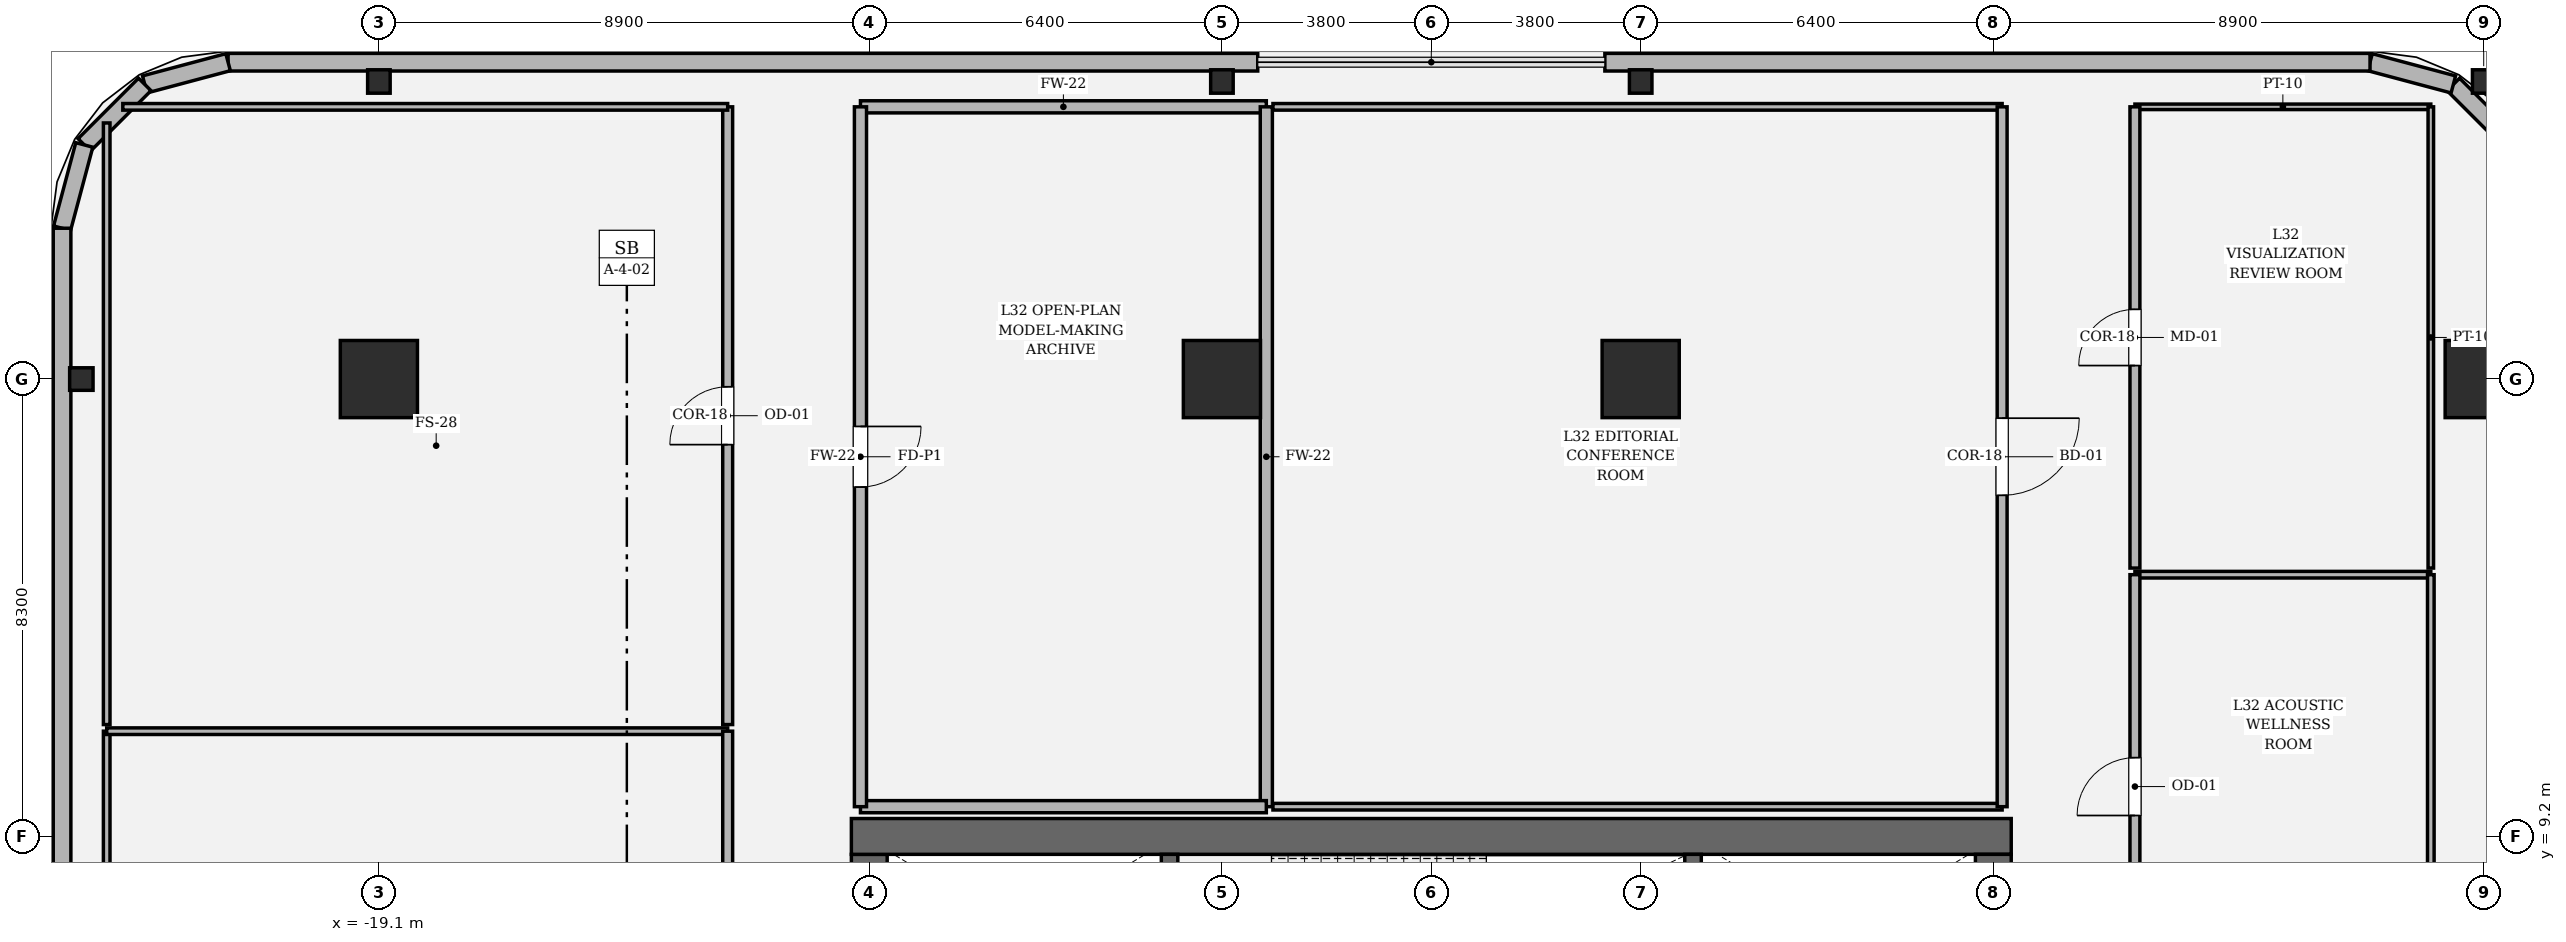
"""IFC4 building model, lengths in metres.
Left out: names, types, materials, properties, quantities, classifications, styles, units other than length and angle.
Written with IfcOpenShell. Run it as: python <this file> out.ifc"""

import sys

from ifc_helpers import new_model, si_unit, direction, frame, frame_2d, origin, origin_2d, place, context, subcontext, project, spatial, rectangle, hollow_rectangle, i_section, extrude, element, fill, save


model = new_model("IFC4")
c1 = context("Model", 3, precision=1e-05, world=origin(), true_north=direction((0.0, 1.0)))
c2 = subcontext(c1, "Body", "Model", "MODEL_VIEW")
j1 = project(units=[si_unit("LENGTHUNIT", "METRE"), si_unit("PLANEANGLEUNIT", "RADIAN")], contexts=[c1])
p1 = place(None, origin())
s1 = spatial("IfcSite", under=j1, at=p1, CompositionType="ELEMENT")
p2 = place(p1, origin())
s2 = spatial("IfcBuilding", under=s1, at=p2, CompositionType="ELEMENT")
p3 = place(p2, frame((0.0, 0.0, 139.8)))
s3 = spatial("IfcBuildingStorey", under=s2, at=p3, CompositionType="ELEMENT", Elevation=139.8)
p4 = place(p3, frame((-10.2, -8.875, 0.0), z_axis=(0.0, 0.0, 1.0), x_axis=(0.0, 1.0, 0.0)))
e1 = element("IfcWall", 1, at=p4, inside=s3, PredefinedType="SHEAR", context=c2, shape_type="SweptSolid", body=[
    extrude(rectangle(XDim=17.75, YDim=0.65, at=frame_2d((8.875, 0.0))), origin(), (0.0, 0.0, 1.0), 4.05),
])
p5 = place(p4, frame((12.665, 0.0, 0.0)))
e2 = element("IfcOpeningElement", 2, at=p5, cuts=e1, PredefinedType="OPENING", context=c2, shape_type="SweptSolid", body=[
    extrude(rectangle(XDim=1.18, YDim=2.2, at=frame_2d((0.59, 1.1))), frame((0.0, 0.335, 0.0), z_axis=(0.0, -1.0, 0.0), x_axis=(1.0, 0.0, 0.0)), (0.0, 0.0, 1.0), 0.67),
])
p6 = place(p3, frame((-10.525, 9.2, 0.0), z_axis=(0.0, 0.0, 1.0), x_axis=(1.0, 0.0, 0.0)))
e3 = element("IfcWall", 3, at=p6, inside=s3, PredefinedType="SHEAR", context=c2, shape_type="SweptSolid", body=[
    extrude(rectangle(XDim=21.05, YDim=0.65, at=frame_2d((10.525, 0.0))), origin(), (0.0, 0.0, 1.0), 4.05),
])
p7 = place(p3, frame((10.2, 8.875, 0.0), z_axis=(0.0, 0.0, 1.0), x_axis=(0.0, -1.0, 0.0)))
e4 = element("IfcWall", 4, at=p7, inside=s3, PredefinedType="SHEAR", context=c2, shape_type="SweptSolid", body=[
    extrude(rectangle(XDim=17.75, YDim=0.65, at=frame_2d((8.875, 0.0))), origin(), (0.0, 0.0, 1.0), 4.05),
])
p8 = place(p7, frame((3.905, 0.0, 0.0)))
e5 = element("IfcOpeningElement", 5, at=p8, cuts=e4, PredefinedType="OPENING", context=c2, shape_type="SweptSolid", body=[
    extrude(rectangle(XDim=1.18, YDim=2.2, at=frame_2d((0.59, 1.1))), frame((0.0, 0.335, 0.0), z_axis=(0.0, -1.0, 0.0), x_axis=(1.0, 0.0, 0.0)), (0.0, 0.0, 1.0), 0.67),
])
for number, where, z_axis, x_axis in (
    (6, (-4.75, 5.3, 0.0), (0.0, 0.0, 1.0), (0.0, 1.0, 0.0)),
    (7, (4.75, 8.875, 0.0), (0.0, 0.0, 1.0), (0.0, -1.0, 0.0)),
):
    element("IfcWall", number, at=place(p3, frame(where, z_axis=z_axis, x_axis=x_axis)), inside=s3, PredefinedType="SOLIDWALL", context=c2, shape_type="SweptSolid", body=[
        extrude(rectangle(XDim=3.575, YDim=0.3, at=frame_2d((1.788, 0.0))), origin(), (0.0, 0.0, 1.0), 4.05),
    ])
for number, where, z_axis, x_axis in (
    (8, (19.1, 17.5, 0.0), (0.0, 0.0, 1.0), (1.0, 0.0, 0.0)),
    (9, (3.8, 17.5, 0.0), (0.0, 0.0, 1.0), (1.0, 0.0, 0.0)),
    (10, (-3.8, 17.5, 0.0), (0.0, 0.0, 1.0), (1.0, 0.0, 0.0)),
    (11, (-19.1, 17.5, 0.0), (0.0, 0.0, 1.0), (1.0, 0.0, 0.0)),
):
    element("IfcColumn", number, at=place(p3, frame(where, z_axis=z_axis, x_axis=x_axis)), inside=s3, PredefinedType="COLUMN", context=c2, shape_type="SweptSolid", body=[
        extrude(hollow_rectangle(XDim=1.4, YDim=1.4, WallThickness=0.042, at=origin_2d()), origin(), (0.0, 0.0, 1.0), 4.05),
    ])
for number, where, z_axis, x_axis in (
    (12, (-19.1, 22.9, 0.0), (0.0, 0.0, 1.0), (1.0, 0.0, 0.0)),
    (13, (-3.8, 22.9, 0.0), (0.0, 0.0, 1.0), (1.0, 0.0, 0.0)),
    (14, (3.8, 22.9, 0.0), (0.0, 0.0, 1.0), (1.0, 0.0, 0.0)),
    (15, (19.1, 22.9, 0.0), (0.0, 0.0, 1.0), (1.0, 0.0, 0.0)),
    (16, (-24.5, 17.5, 0.0), (0.0, 0.0, 1.0), (0.0, 1.0, 0.0)),
):
    element("IfcColumn", number, at=place(p3, frame(where, z_axis=z_axis, x_axis=x_axis)), inside=s3, PredefinedType="COLUMN", context=c2, shape_type="SweptSolid", body=[
        extrude(i_section(OverallWidth=0.409, OverallDepth=0.425, WebThickness=0.032, FlangeThickness=0.052, FilletRadius=0.018, at=origin_2d()), origin(), (0.0, 0.0, 1.0), 4.048),
    ])
p9 = place(p3, frame((19.646, 21.749, 0.0), z_axis=(0.0, 0.0, 1.0), x_axis=(-0.707028130747, 0.707185422879, 0.0)))
e17 = element("IfcWall", 17, at=p9, inside=s3, PredefinedType="SOLIDWALL", context=c2, shape_type="SweptSolid", body=[
    extrude(rectangle(XDim=1.552, YDim=0.32, at=frame_2d((0.776, 0.0))), origin(), (0.0, 0.0, 1.0), 2.504),
])
p10 = place(p3, frame((18.549, 22.847, 0.0), z_axis=(0.0, 0.0, 1.0), x_axis=(-0.966224582397, 0.257701486942, 0.0)))
e18 = element("IfcWall", 18, at=p10, inside=s3, PredefinedType="SOLIDWALL", context=c2, shape_type="SweptSolid", body=[
    extrude(rectangle(XDim=1.565, YDim=0.32, at=frame_2d((0.783, 0.0))), origin(), (0.0, 0.0, 1.0), 2.544),
])
p11 = place(p3, frame((17.037, 23.25, 0.0), z_axis=(0.0, 0.0, 1.0), x_axis=(-1.0, 0.0, 0.0)))
e19 = element("IfcWall", 19, at=p11, inside=s3, PredefinedType="SOLIDWALL", context=c2, shape_type="SweptSolid", body=[
    extrude(rectangle(XDim=13.887, YDim=0.32, at=frame_2d((6.943, 0.0))), origin(), (0.0, 0.0, 1.0), 2.544),
])
p12 = place(p3, frame((-3.15, 23.25, 0.0), z_axis=(0.0, 0.0, 1.0), x_axis=(-1.0, 0.0, 0.0)))
e20 = element("IfcWall", 20, at=p12, inside=s3, PredefinedType="SOLIDWALL", context=c2, shape_type="SweptSolid", body=[
    extrude(rectangle(XDim=18.687, YDim=0.32, at=frame_2d((9.344, 0.0))), origin(), (0.0, 0.0, 1.0), 2.544),
])
p13 = place(p3, frame((-21.837, 23.25, 0.0), z_axis=(0.0, 0.0, 1.0), x_axis=(-0.966224582397, -0.257701486942, 0.0)))
e21 = element("IfcWall", 21, at=p13, inside=s3, PredefinedType="SOLIDWALL", context=c2, shape_type="SweptSolid", body=[
    extrude(rectangle(XDim=1.565, YDim=0.32, at=frame_2d((0.783, 0.0))), origin(), (0.0, 0.0, 1.0), 3.83),
])
p14 = place(p3, frame((-23.349, 22.847, 0.0), z_axis=(0.0, 0.0, 1.0), x_axis=(-0.707028130747, -0.707185422879, 0.0)))
e22 = element("IfcWall", 22, at=p14, inside=s3, PredefinedType="SOLIDWALL", context=c2, shape_type="SweptSolid", body=[
    extrude(rectangle(XDim=1.552, YDim=0.32, at=frame_2d((0.776, 0.0))), origin(), (0.0, 0.0, 1.0), 3.83),
])
p15 = place(p3, frame((-24.447, 21.749, 0.0), z_axis=(0.0, 0.0, 1.0), x_axis=(-0.257847112249, -0.966185730957, 0.0)))
e23 = element("IfcWall", 23, at=p15, inside=s3, PredefinedType="SOLIDWALL", context=c2, shape_type="SweptSolid", body=[
    extrude(rectangle(XDim=1.565, YDim=0.32, at=frame_2d((0.783, 0.0))), origin(), (0.0, 0.0, 1.0), 3.83),
])
p16 = place(p3, frame((-24.85, 20.237, 0.0), z_axis=(0.0, 0.0, 1.0), x_axis=(0.0, -1.0, 0.0)))
e24 = element("IfcWall", 24, at=p16, inside=s3, PredefinedType="SOLIDWALL", context=c2, shape_type="SweptSolid", body=[
    extrude(rectangle(XDim=17.487, YDim=0.32, at=frame_2d((8.743, 0.0))), origin(), (0.0, 0.0, 1.0), 2.544),
])
p17 = place(p3, frame((-24.04, -11.49, 0.0), z_axis=(0.0, 0.0, 1.0), x_axis=(0.0, 1.0, 0.0)))
e25 = element("IfcWall", 25, at=p17, inside=s3, PredefinedType="PARTITIONING", context=c2, shape_type="SweptSolid", body=[
    extrude(rectangle(XDim=22.6, YDim=0.12, at=frame_2d((11.3, 0.0))), origin(), (0.0, 0.0, 1.0), 2.504),
])
p18 = place(p3, frame((-24.04, 11.11, 0.0), z_axis=(0.0, 0.0, 1.0), x_axis=(1.0, 0.0, 0.0)))
e26 = element("IfcWall", 26, at=p18, inside=s3, PredefinedType="PARTITIONING", context=c2, shape_type="SweptSolid", body=[
    extrude(rectangle(XDim=11.27, YDim=0.12, at=frame_2d((5.635, 0.0))), origin(), (0.0, 0.0, 1.0), 3.174),
])
p19 = place(p3, frame((-12.77, 11.11, 0.0), z_axis=(0.0, 0.0, 1.0), x_axis=(0.0, -1.0, 0.0)))
e27 = element("IfcWall", 27, at=p19, inside=s3, PredefinedType="PARTITIONING", context=c2, shape_type="SweptSolid", body=[
    extrude(rectangle(XDim=22.6, YDim=0.18, at=frame_2d((11.3, 0.0))), origin(), (0.0, 0.0, 1.0), 3.174),
])
p20 = place(p19, frame((10.6, 0.0, 0.0)))
e28 = element("IfcOpeningElement", 28, at=p20, cuts=e27, PredefinedType="OPENING", context=c2, shape_type="SweptSolid", body=[
    extrude(rectangle(XDim=1.4, YDim=2.25, at=frame_2d((0.7, 1.125))), frame((0.0, 0.1, 0.0), z_axis=(0.0, -1.0, 0.0), x_axis=(1.0, 0.0, 0.0)), (0.0, 0.0, 1.0), 0.2),
])
p21 = place(p3, frame((12.77, 13.95, 0.0), z_axis=(0.0, 0.0, 1.0), x_axis=(1.0, 0.0, 0.0)))
e29 = element("IfcWall", 29, at=p21, inside=s3, PredefinedType="PARTITIONING", context=c2, shape_type="SweptSolid", body=[
    extrude(rectangle(XDim=5.37, YDim=0.12, at=frame_2d((2.685, 0.0))), origin(), (0.0, 0.0, 1.0), 3.424),
])
p22 = place(p3, frame((18.14, 13.95, 0.0), z_axis=(0.0, 0.0, 1.0), x_axis=(0.0, -1.0, 0.0)))
e30 = element("IfcWall", 30, at=p22, inside=s3, PredefinedType="PARTITIONING", context=c2, shape_type="SweptSolid", body=[
    extrude(rectangle(XDim=7.69, YDim=0.12, at=frame_2d((3.845, 0.0))), origin(), (0.0, 0.0, 1.0), 3.174),
])
p23 = place(p3, frame((12.77, 6.26, 0.0), z_axis=(0.0, 0.0, 1.0), x_axis=(0.0, 1.0, 0.0)))
e31 = element("IfcWall", 31, at=p23, inside=s3, PredefinedType="PARTITIONING", context=c2, shape_type="SweptSolid", body=[
    extrude(rectangle(XDim=7.69, YDim=0.18, at=frame_2d((3.845, 0.0))), origin(), (0.0, 0.0, 1.0), 3.174),
])
p24 = place(p23, frame((3.32, 0.0, 0.0)))
e32 = element("IfcOpeningElement", 32, at=p24, cuts=e31, PredefinedType="OPENING", context=c2, shape_type="SweptSolid", body=[
    extrude(rectangle(XDim=1.05, YDim=2.2, at=frame_2d((0.525, 1.1))), frame((0.0, 0.1, 0.0), z_axis=(0.0, -1.0, 0.0), x_axis=(1.0, 0.0, 0.0)), (0.0, 0.0, 1.0), 0.2),
])
p25 = place(p3, frame((-10.36, 22.44, 0.0), z_axis=(0.0, 0.0, 1.0), x_axis=(1.0, 0.0, 0.0)))
e33 = element("IfcWall", 33, at=p25, inside=s3, PredefinedType="SOLIDWALL", context=c2, shape_type="SweptSolid", body=[
    extrude(rectangle(XDim=7.366, YDim=0.22, at=frame_2d((3.683, 0.0))), origin(), (0.0, 0.0, 1.0), 2.504),
])
p26 = place(p3, frame((-2.994, 22.44, 0.0), z_axis=(0.0, 0.0, 1.0), x_axis=(0.0, -1.0, 0.0)))
e34 = element("IfcWall", 34, at=p26, inside=s3, PredefinedType="SOLIDWALL", context=c2, shape_type="SweptSolid", body=[
    extrude(rectangle(XDim=12.7, YDim=0.22, at=frame_2d((6.35, 0.0))), origin(), (0.0, 0.0, 1.0), 3.174),
])
p27 = place(p3, frame((-2.994, 9.74, 0.0), z_axis=(0.0, 0.0, 1.0), x_axis=(-1.0, 0.0, 0.0)))
e35 = element("IfcWall", 35, at=p27, inside=s3, PredefinedType="SOLIDWALL", context=c2, shape_type="SweptSolid", body=[
    extrude(rectangle(XDim=7.366, YDim=0.22, at=frame_2d((3.683, 0.0))), origin(), (0.0, 0.0, 1.0), 3.174),
])
p28 = place(p3, frame((-10.36, 9.74, 0.0), z_axis=(0.0, 0.0, 1.0), x_axis=(0.0, 1.0, 0.0)))
e36 = element("IfcWall", 36, at=p28, inside=s3, PredefinedType="SOLIDWALL", context=c2, shape_type="SweptSolid", body=[
    extrude(rectangle(XDim=12.7, YDim=0.22, at=frame_2d((6.35, 0.0))), origin(), (0.0, 0.0, 1.0), 3.174),
])
p29 = place(p28, frame((5.8, 0.0, 0.0)))
e37 = element("IfcOpeningElement", 37, at=p29, cuts=e36, PredefinedType="OPENING", context=c2, shape_type="SweptSolid", body=[
    extrude(rectangle(XDim=1.1, YDim=2.2, at=frame_2d((0.55, 1.1))), frame((0.0, 0.12, 0.0), z_axis=(0.0, -1.0, 0.0), x_axis=(1.0, 0.0, 0.0)), (0.0, 0.0, 1.0), 0.24),
])
p30 = place(p3, frame((10.36, 9.74, 0.0), z_axis=(0.0, 0.0, 1.0), x_axis=(-1.0, 0.0, 0.0)))
e38 = element("IfcWall", 38, at=p30, inside=s3, PredefinedType="PARTITIONING", context=c2, shape_type="SweptSolid", body=[
    extrude(rectangle(XDim=13.234, YDim=0.12, at=frame_2d((6.617, 0.0))), origin(), (0.0, 0.0, 1.0), 3.174),
])
p31 = place(p3, frame((-2.874, 22.44, 0.0), z_axis=(0.0, 0.0, 1.0), x_axis=(1.0, 0.0, 0.0)))
e39 = element("IfcWall", 39, at=p31, inside=s3, PredefinedType="PARTITIONING", context=c2, shape_type="SweptSolid", body=[
    extrude(rectangle(XDim=13.234, YDim=0.12, at=frame_2d((6.617, 0.0))), origin(), (0.0, 0.0, 1.0), 2.504),
])
p32 = place(p3, frame((10.36, 22.44, 0.0), z_axis=(0.0, 0.0, 1.0), x_axis=(0.0, -1.0, 0.0)))
e40 = element("IfcWall", 40, at=p32, inside=s3, PredefinedType="PARTITIONING", context=c2, shape_type="SweptSolid", body=[
    extrude(rectangle(XDim=12.7, YDim=0.18, at=frame_2d((6.35, 0.0))), origin(), (0.0, 0.0, 1.0), 3.174),
])
p33 = place(p32, frame((5.65, 0.0, 0.0)))
e41 = element("IfcOpeningElement", 41, at=p33, cuts=e40, PredefinedType="OPENING", context=c2, shape_type="SweptSolid", body=[
    extrude(rectangle(XDim=1.4, YDim=2.25, at=frame_2d((0.7, 1.125))), frame((0.0, 0.1, 0.0), z_axis=(0.0, -1.0, 0.0), x_axis=(1.0, 0.0, 0.0)), (0.0, 0.0, 1.0), 0.2),
])
p34 = place(p3, frame((-12.77, 22.44, 0.0), z_axis=(0.0, 0.0, 1.0), x_axis=(0.0, -1.0, 0.0)))
e42 = element("IfcWall", 42, at=p34, inside=s3, PredefinedType="PARTITIONING", context=c2, shape_type="SweptSolid", body=[
    extrude(rectangle(XDim=11.21, YDim=0.18, at=frame_2d((5.605, 0.0))), origin(), (0.0, 0.0, 1.0), 3.174),
])
p35 = place(p34, frame((5.08, 0.0, 0.0)))
e43 = element("IfcOpeningElement", 43, at=p35, cuts=e42, PredefinedType="OPENING", context=c2, shape_type="SweptSolid", body=[
    extrude(rectangle(XDim=1.05, YDim=2.2, at=frame_2d((0.525, 1.1))), frame((0.0, 0.1, 0.0), z_axis=(0.0, -1.0, 0.0), x_axis=(1.0, 0.0, 0.0)), (0.0, 0.0, 1.0), 0.2),
])
p36 = place(p3, frame((-24.04, 11.23, 0.0), z_axis=(0.0, 0.0, 1.0), x_axis=(0.0, 1.0, 0.0)))
e44 = element("IfcWall", 44, at=p36, inside=s3, PredefinedType="PARTITIONING", context=c2, shape_type="SweptSolid", body=[
    extrude(rectangle(XDim=10.917, YDim=0.12, at=frame_2d((5.459, 0.0))), origin(), (0.0, 0.0, 1.0), 2.504),
])
p37 = place(p3, frame((-23.748, 22.44, 0.0), z_axis=(0.0, 0.0, 1.0), x_axis=(1.0, 0.0, 0.0)))
e45 = element("IfcWall", 45, at=p37, inside=s3, PredefinedType="PARTITIONING", context=c2, shape_type="SweptSolid", body=[
    extrude(rectangle(XDim=10.978, YDim=0.12, at=frame_2d((5.489, 0.0))), origin(), (0.0, 0.0, 1.0), 2.504),
])
p38 = place(p3, frame((12.77, 22.44, 0.0), z_axis=(0.0, 0.0, 1.0), x_axis=(1.0, 0.0, 0.0)))
e46 = element("IfcWall", 46, at=p38, inside=s3, PredefinedType="PARTITIONING", context=c2, shape_type="SweptSolid", body=[
    extrude(rectangle(XDim=5.37, YDim=0.1, at=frame_2d((2.685, 0.0))), origin(), (0.0, 0.0, 1.0), 3.83),
])
p39 = place(p3, frame((18.14, 22.44, 0.0), z_axis=(0.0, 0.0, 1.0), x_axis=(0.0, -1.0, 0.0)))
e47 = element("IfcWall", 47, at=p39, inside=s3, PredefinedType="PARTITIONING", context=c2, shape_type="SweptSolid", body=[
    extrude(rectangle(XDim=8.37, YDim=0.1, at=frame_2d((4.185, 0.0))), origin(), (0.0, 0.0, 1.0), 3.174),
])
p40 = place(p3, frame((12.77, 14.07, 0.0), z_axis=(0.0, 0.0, 1.0), x_axis=(0.0, 1.0, 0.0)))
e48 = element("IfcWall", 48, at=p40, inside=s3, PredefinedType="PARTITIONING", context=c2, shape_type="SweptSolid", body=[
    extrude(rectangle(XDim=8.37, YDim=0.18, at=frame_2d((4.185, 0.0))), origin(), (0.0, 0.0, 1.0), 3.174),
])
p41 = place(p40, frame((3.675, 0.0, 0.0)))
e49 = element("IfcOpeningElement", 49, at=p41, cuts=e48, PredefinedType="OPENING", context=c2, shape_type="SweptSolid", body=[
    extrude(rectangle(XDim=1.02, YDim=2.2, at=frame_2d((0.51, 1.1))), frame((0.0, 0.1, 0.0), z_axis=(0.0, -1.0, 0.0), x_axis=(1.0, 0.0, 0.0)), (0.0, 0.0, 1.0), 0.2),
])
p42 = place(p24, origin())
e50 = element("IfcDoor", 50, at=p42, inside=s3, OperationType="SINGLE_SWING_LEFT", PredefinedType="DOOR", context=c2, shape_type="SweptSolid", body=[
    extrude(rectangle(XDim=1.05, YDim=2.2, at=frame_2d((0.525, 1.1))), frame((0.0, 0.025, 0.0), z_axis=(0.0, -1.0, 0.0), x_axis=(1.0, 0.0, 0.0)), (0.0, 0.0, 1.0), 0.05),
])
fill(e32, e50)
p43 = place(p29, origin())
e51 = element("IfcDoor", 51, at=p43, inside=s3, OperationType="SINGLE_SWING_RIGHT", PredefinedType="DOOR", context=c2, shape_type="SweptSolid", body=[
    extrude(rectangle(XDim=1.1, YDim=2.2, at=frame_2d((0.55, 1.1))), frame((0.0, 0.025, 0.0), z_axis=(0.0, -1.0, 0.0), x_axis=(1.0, 0.0, 0.0)), (0.0, 0.0, 1.0), 0.05),
])
fill(e37, e51)
p44 = place(p33, origin())
e52 = element("IfcDoor", 52, at=p44, inside=s3, OperationType="SINGLE_SWING_LEFT", PredefinedType="DOOR", context=c2, shape_type="SweptSolid", body=[
    extrude(rectangle(XDim=1.4, YDim=2.25, at=frame_2d((0.7, 1.125))), frame((0.0, 0.025, 0.0), z_axis=(0.0, -1.0, 0.0), x_axis=(1.0, 0.0, 0.0)), (0.0, 0.0, 1.0), 0.05),
])
fill(e41, e52)
p45 = place(p35, origin())
e53 = element("IfcDoor", 53, at=p45, inside=s3, OperationType="SINGLE_SWING_RIGHT", PredefinedType="DOOR", context=c2, shape_type="SweptSolid", body=[
    extrude(rectangle(XDim=1.05, YDim=2.2, at=frame_2d((0.525, 1.1))), frame((0.0, 0.025, 0.0), z_axis=(0.0, -1.0, 0.0), x_axis=(1.0, 0.0, 0.0)), (0.0, 0.0, 1.0), 0.05),
])
fill(e43, e53)
p46 = place(p41, origin())
e54 = element("IfcDoor", 54, at=p46, inside=s3, OperationType="SINGLE_SWING_LEFT", PredefinedType="DOOR", context=c2, shape_type="SweptSolid", body=[
    extrude(rectangle(XDim=1.02, YDim=2.2, at=frame_2d((0.51, 1.1))), frame((0.0, 0.025, 0.0), z_axis=(0.0, -1.0, 0.0), x_axis=(1.0, 0.0, 0.0)), (0.0, 0.0, 1.0), 0.05),
])
fill(e49, e54)
save(model, sys.argv[1])
